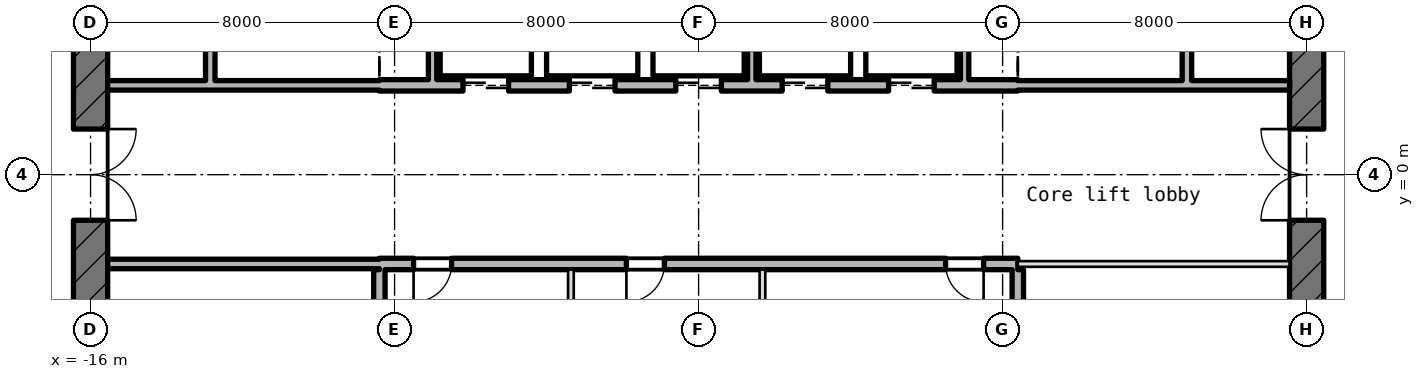
"""IFC4 building model, lengths in metres.
Left out: names, types, materials, properties, quantities, classifications, styles, units other than length and angle.
Written with IfcOpenShell. Run it as: python <this file> out.ifc"""

import sys

from ifc_helpers import new_model, si_unit, direction, frame, frame_2d, origin, place, context, subcontext, project, spatial, rectangle, extrude, element, fill, save


model = new_model("IFC4")
c1 = context("Model", 3, precision=1e-05, world=origin(), true_north=direction((0.0, 1.0)))
c2 = subcontext(c1, "Body", "Model", "MODEL_VIEW")
j1 = project(units=[si_unit("LENGTHUNIT", "METRE"), si_unit("PLANEANGLEUNIT", "RADIAN")], contexts=[c1])
p1 = place(None, origin())
s1 = spatial("IfcSite", under=j1, at=p1, CompositionType="ELEMENT")
p2 = place(p1, origin())
s2 = spatial("IfcBuilding", under=s1, at=p2, CompositionType="ELEMENT")
p3 = place(p2, frame((0.0, 0.0, 173.5)))
s3 = spatial("IfcBuildingStorey", under=s2, at=p3, CompositionType="ELEMENT", Elevation=173.5)
p4 = place(p3, frame((16.0, -10.186, -0.18), z_axis=(0.0, 0.0, 1.0), x_axis=(0.0, 1.0, 0.0)))
e1 = element("IfcWall", 1, at=p4, inside=s3, PredefinedType="SHEAR", context=c2, shape_type="SweptSolid", body=[
    extrude(rectangle(XDim=20.373, YDim=0.9, at=frame_2d((10.186, 0.0))), origin(), (0.0, 0.0, 1.0), 4.15),
])
p5 = place(p4, frame((8.986, 0.0, 0.18)))
e2 = element("IfcOpeningElement", 2, at=p5, cuts=e1, PredefinedType="OPENING", context=c2, shape_type="SweptSolid", body=[
    extrude(rectangle(XDim=2.4, YDim=2.1, at=frame_2d((1.2, 1.05))), frame((0.0, 0.46, 0.0), z_axis=(0.0, -1.0, 0.0), x_axis=(1.0, 0.0, 0.0)), (0.0, 0.0, 1.0), 0.92),
])
p6 = place(p4, frame((13.586, 0.0, 0.18)))
e3 = element("IfcOpeningElement", 3, at=p6, cuts=e1, PredefinedType="OPENING", context=c2, shape_type="SweptSolid", body=[
    extrude(rectangle(XDim=1.2, YDim=2.1, at=frame_2d((0.6, 1.05))), frame((0.0, 0.46, 0.0), z_axis=(0.0, -1.0, 0.0), x_axis=(1.0, 0.0, 0.0)), (0.0, 0.0, 1.0), 0.92),
])
p7 = place(p4, frame((2.4, 0.0, 0.18)))
e4 = element("IfcOpeningElement", 4, at=p7, cuts=e1, PredefinedType="OPENING", context=c2, shape_type="SweptSolid", body=[
    extrude(rectangle(XDim=1.2, YDim=2.1, at=frame_2d((0.6, 1.05))), frame((0.0, 0.46, 0.0), z_axis=(0.0, -1.0, 0.0), x_axis=(1.0, 0.0, 0.0)), (0.0, 0.0, 1.0), 0.92),
])
p8 = place(p3, frame((-16.0, 10.186, -0.18), z_axis=(0.0, 0.0, 1.0), x_axis=(0.0, -1.0, 0.0)))
e5 = element("IfcWall", 5, at=p8, inside=s3, PredefinedType="SHEAR", context=c2, shape_type="SweptSolid", body=[
    extrude(rectangle(XDim=20.373, YDim=0.9, at=frame_2d((10.186, 0.0))), origin(), (0.0, 0.0, 1.0), 4.15),
])
p9 = place(p8, frame((8.986, 0.0, 0.18)))
e6 = element("IfcOpeningElement", 6, at=p9, cuts=e5, PredefinedType="OPENING", context=c2, shape_type="SweptSolid", body=[
    extrude(rectangle(XDim=2.4, YDim=2.1, at=frame_2d((1.2, 1.05))), frame((0.0, 0.46, 0.0), z_axis=(0.0, -1.0, 0.0), x_axis=(1.0, 0.0, 0.0)), (0.0, 0.0, 1.0), 0.92),
])
p10 = place(p8, frame((5.586, 0.0, 0.18)))
e7 = element("IfcOpeningElement", 7, at=p10, cuts=e5, PredefinedType="OPENING", context=c2, shape_type="SweptSolid", body=[
    extrude(rectangle(XDim=1.2, YDim=2.1, at=frame_2d((0.6, 1.05))), frame((0.0, 0.46, 0.0), z_axis=(0.0, -1.0, 0.0), x_axis=(1.0, 0.0, 0.0)), (0.0, 0.0, 1.0), 0.92),
])
p11 = place(p3, frame((-15.55, -2.35, 0.0), z_axis=(0.0, 0.0, 1.0), x_axis=(1.0, 0.0, 0.0)))
e8 = element("IfcWall", 8, at=p11, inside=s3, PredefinedType="STANDARD", context=c2, shape_type="SweptSolid", body=[
    extrude(rectangle(XDim=7.15, YDim=0.25, at=frame_2d((3.575, 0.0))), origin(), (0.0, 0.0, 1.0), 3.97),
])
p12 = place(p3, frame((-8.4, -2.35, -0.18), z_axis=(0.0, 0.0, 1.0), x_axis=(1.0, 0.0, 0.0)))
e9 = element("IfcWall", 9, at=p12, inside=s3, PredefinedType="SHEAR", context=c2, shape_type="SweptSolid", body=[
    extrude(rectangle(XDim=16.8, YDim=0.3, at=frame_2d((8.4, 0.0))), origin(), (0.0, 0.0, 1.0), 4.15),
])
p13 = place(p12, frame((0.9, 0.0, 0.18)))
e10 = element("IfcOpeningElement", 10, at=p13, cuts=e9, PredefinedType="OPENING", context=c2, shape_type="SweptSolid", body=[
    extrude(rectangle(XDim=1.0, YDim=2.1, at=frame_2d((0.5, 1.05))), frame((0.0, 0.16, 0.0), z_axis=(0.0, -1.0, 0.0), x_axis=(1.0, 0.0, 0.0)), (0.0, 0.0, 1.0), 0.32),
])
p14 = place(p12, frame((6.5, 0.0, 0.18)))
e11 = element("IfcOpeningElement", 11, at=p14, cuts=e9, PredefinedType="OPENING", context=c2, shape_type="SweptSolid", body=[
    extrude(rectangle(XDim=1.0, YDim=2.1, at=frame_2d((0.5, 1.05))), frame((0.0, 0.16, 0.0), z_axis=(0.0, -1.0, 0.0), x_axis=(1.0, 0.0, 0.0)), (0.0, 0.0, 1.0), 0.32),
])
p15 = place(p12, frame((14.9, 0.0, 0.18)))
e12 = element("IfcOpeningElement", 12, at=p15, cuts=e9, PredefinedType="OPENING", context=c2, shape_type="SweptSolid", body=[
    extrude(rectangle(XDim=1.0, YDim=2.1, at=frame_2d((0.5, 1.05))), frame((0.0, 0.16, 0.0), z_axis=(0.0, -1.0, 0.0), x_axis=(1.0, 0.0, 0.0)), (0.0, 0.0, 1.0), 0.32),
])
p16 = place(p3, frame((8.4, -2.35, 0.0), z_axis=(0.0, 0.0, 1.0), x_axis=(1.0, 0.0, 0.0)))
e13 = element("IfcWall", 13, at=p16, inside=s3, PredefinedType="PARTITIONING", context=c2, shape_type="SweptSolid", body=[
    extrude(rectangle(XDim=7.15, YDim=0.15, at=frame_2d((3.575, 0.0))), origin(), (0.0, 0.0, 1.0), 3.97),
])
p17 = place(p3, frame((-15.55, 2.35, 0.0), z_axis=(0.0, 0.0, 1.0), x_axis=(1.0, 0.0, 0.0)))
e14 = element("IfcWall", 14, at=p17, inside=s3, PredefinedType="STANDARD", context=c2, shape_type="SweptSolid", body=[
    extrude(rectangle(XDim=7.15, YDim=0.25, at=frame_2d((3.575, 0.0))), origin(), (0.0, 0.0, 1.0), 3.97),
])
p18 = place(p3, frame((-8.4, 2.35, -0.18), z_axis=(0.0, 0.0, 1.0), x_axis=(1.0, 0.0, 0.0)))
e15 = element("IfcWall", 15, at=p18, inside=s3, PredefinedType="SHEAR", context=c2, shape_type="SweptSolid", body=[
    extrude(rectangle(XDim=16.8, YDim=0.3, at=frame_2d((8.4, 0.0))), origin(), (0.0, 0.0, 1.0), 4.15),
])
p19 = place(p18, frame((2.2, 0.0, 0.18)))
e16 = element("IfcOpeningElement", 16, at=p19, cuts=e15, PredefinedType="OPENING", context=c2, shape_type="SweptSolid", body=[
    extrude(rectangle(XDim=1.2, YDim=2.1, at=frame_2d((0.6, 1.05))), frame((0.0, 0.16, 0.0), z_axis=(0.0, -1.0, 0.0), x_axis=(1.0, 0.0, 0.0)), (0.0, 0.0, 1.0), 0.32),
])
p20 = place(p18, frame((5.0, 0.0, 0.18)))
e17 = element("IfcOpeningElement", 17, at=p20, cuts=e15, PredefinedType="OPENING", context=c2, shape_type="SweptSolid", body=[
    extrude(rectangle(XDim=1.2, YDim=2.1, at=frame_2d((0.6, 1.05))), frame((0.0, 0.16, 0.0), z_axis=(0.0, -1.0, 0.0), x_axis=(1.0, 0.0, 0.0)), (0.0, 0.0, 1.0), 0.32),
])
p21 = place(p18, frame((7.8, 0.0, 0.18)))
e18 = element("IfcOpeningElement", 18, at=p21, cuts=e15, PredefinedType="OPENING", context=c2, shape_type="SweptSolid", body=[
    extrude(rectangle(XDim=1.2, YDim=2.1, at=frame_2d((0.6, 1.05))), frame((0.0, 0.16, 0.0), z_axis=(0.0, -1.0, 0.0), x_axis=(1.0, 0.0, 0.0)), (0.0, 0.0, 1.0), 0.32),
])
p22 = place(p18, frame((10.6, 0.0, 0.18)))
e19 = element("IfcOpeningElement", 19, at=p22, cuts=e15, PredefinedType="OPENING", context=c2, shape_type="SweptSolid", body=[
    extrude(rectangle(XDim=1.2, YDim=2.1, at=frame_2d((0.6, 1.05))), frame((0.0, 0.16, 0.0), z_axis=(0.0, -1.0, 0.0), x_axis=(1.0, 0.0, 0.0)), (0.0, 0.0, 1.0), 0.32),
])
p23 = place(p18, frame((13.4, 0.0, 0.18)))
e20 = element("IfcOpeningElement", 20, at=p23, cuts=e15, PredefinedType="OPENING", context=c2, shape_type="SweptSolid", body=[
    extrude(rectangle(XDim=1.2, YDim=2.1, at=frame_2d((0.6, 1.05))), frame((0.0, 0.16, 0.0), z_axis=(0.0, -1.0, 0.0), x_axis=(1.0, 0.0, 0.0)), (0.0, 0.0, 1.0), 0.32),
])
p24 = place(p3, frame((8.4, 2.35, 0.0), z_axis=(0.0, 0.0, 1.0), x_axis=(1.0, 0.0, 0.0)))
e21 = element("IfcWall", 21, at=p24, inside=s3, PredefinedType="STANDARD", context=c2, shape_type="SweptSolid", body=[
    extrude(rectangle(XDim=7.15, YDim=0.25, at=frame_2d((3.575, 0.0))), origin(), (0.0, 0.0, 1.0), 3.97),
])
p25 = place(p3, frame((-12.85, 2.475, 0.0), z_axis=(0.0, 0.0, 1.0), x_axis=(0.0, 1.0, 0.0)))
e22 = element("IfcWall", 22, at=p25, inside=s3, PredefinedType="STANDARD", context=c2, shape_type="SweptSolid", body=[
    extrude(rectangle(XDim=3.05, YDim=0.25, at=frame_2d((1.525, 0.0))), origin(), (0.0, 0.0, 1.0), 3.97),
])
p26 = place(p3, frame((-8.4, -8.75, -0.18), z_axis=(0.0, 0.0, 1.0), x_axis=(0.0, 1.0, 0.0)))
e23 = element("IfcWall", 23, at=p26, inside=s3, PredefinedType="SHEAR", context=c2, shape_type="SweptSolid", body=[
    extrude(rectangle(XDim=6.25, YDim=0.3, at=frame_2d((3.125, 0.0))), origin(), (0.0, 0.0, 1.0), 4.15),
])
p27 = place(p3, frame((-7.0, 2.5, 0.0), z_axis=(0.0, 0.0, 1.0), x_axis=(0.0, 1.0, 0.0)))
e24 = element("IfcWall", 24, at=p27, inside=s3, PredefinedType="STANDARD", context=c2, shape_type="SweptSolid", body=[
    extrude(rectangle(XDim=2.74, YDim=0.22, at=frame_2d((1.37, 0.0))), origin(), (0.0, 0.0, 1.0), 3.97),
])
p28 = place(p3, frame((-3.36, -5.24, 0.0), z_axis=(0.0, 0.0, 1.0), x_axis=(0.0, 1.0, 0.0)))
e25 = element("IfcWall", 25, at=p28, inside=s3, PredefinedType="PARTITIONING", context=c2, shape_type="SweptSolid", body=[
    extrude(rectangle(XDim=2.74, YDim=0.15, at=frame_2d((1.37, 0.0))), origin(), (0.0, 0.0, 1.0), 3.97),
])
p29 = place(p3, frame((1.4, 2.5, 0.0), z_axis=(0.0, 0.0, 1.0), x_axis=(0.0, 1.0, 0.0)))
e26 = element("IfcWall", 26, at=p29, inside=s3, PredefinedType="STANDARD", context=c2, shape_type="SweptSolid", body=[
    extrude(rectangle(XDim=2.74, YDim=0.22, at=frame_2d((1.37, 0.0))), origin(), (0.0, 0.0, 1.0), 3.97),
])
p30 = place(p3, frame((1.68, -5.24, 0.0), z_axis=(0.0, 0.0, 1.0), x_axis=(0.0, 1.0, 0.0)))
e27 = element("IfcWall", 27, at=p30, inside=s3, PredefinedType="PARTITIONING", context=c2, shape_type="SweptSolid", body=[
    extrude(rectangle(XDim=2.74, YDim=0.15, at=frame_2d((1.37, 0.0))), origin(), (0.0, 0.0, 1.0), 3.97),
])
p31 = place(p3, frame((7.0, 2.5, 0.0), z_axis=(0.0, 0.0, 1.0), x_axis=(0.0, 1.0, 0.0)))
e28 = element("IfcWall", 28, at=p31, inside=s3, PredefinedType="STANDARD", context=c2, shape_type="SweptSolid", body=[
    extrude(rectangle(XDim=2.74, YDim=0.22, at=frame_2d((1.37, 0.0))), origin(), (0.0, 0.0, 1.0), 3.97),
])
p32 = place(p3, frame((8.4, -8.35, -0.18), z_axis=(0.0, 0.0, 1.0), x_axis=(0.0, 1.0, 0.0)))
e29 = element("IfcWall", 29, at=p32, inside=s3, PredefinedType="SHEAR", context=c2, shape_type="SweptSolid", body=[
    extrude(rectangle(XDim=5.85, YDim=0.3, at=frame_2d((2.925, 0.0))), origin(), (0.0, 0.0, 1.0), 4.15),
])
p33 = place(p3, frame((12.85, 2.475, 0.0), z_axis=(0.0, 0.0, 1.0), x_axis=(0.0, 1.0, 0.0)))
e30 = element("IfcWall", 30, at=p33, inside=s3, PredefinedType="STANDARD", context=c2, shape_type="SweptSolid", body=[
    extrude(rectangle(XDim=3.05, YDim=0.25, at=frame_2d((1.525, 0.0))), origin(), (0.0, 0.0, 1.0), 3.97),
])
p34 = place(p19, origin())
e31 = element("IfcDoor", 31, at=p34, inside=s3, OperationType="DOUBLE_DOOR_SLIDING", PredefinedType="DOOR", context=c2, shape_type="SweptSolid", body=[
    extrude(rectangle(XDim=1.2, YDim=2.1, at=frame_2d((0.6, 1.05))), frame((0.0, 0.025, 0.0), z_axis=(0.0, -1.0, 0.0), x_axis=(1.0, 0.0, 0.0)), (0.0, 0.0, 1.0), 0.05),
])
fill(e16, e31)
p35 = place(p20, origin())
e32 = element("IfcDoor", 32, at=p35, inside=s3, OperationType="DOUBLE_DOOR_SLIDING", PredefinedType="DOOR", context=c2, shape_type="SweptSolid", body=[
    extrude(rectangle(XDim=1.2, YDim=2.1, at=frame_2d((0.6, 1.05))), frame((0.0, 0.025, 0.0), z_axis=(0.0, -1.0, 0.0), x_axis=(1.0, 0.0, 0.0)), (0.0, 0.0, 1.0), 0.05),
])
fill(e17, e32)
p36 = place(p21, origin())
e33 = element("IfcDoor", 33, at=p36, inside=s3, OperationType="DOUBLE_DOOR_SLIDING", PredefinedType="DOOR", context=c2, shape_type="SweptSolid", body=[
    extrude(rectangle(XDim=1.2, YDim=2.1, at=frame_2d((0.6, 1.05))), frame((0.0, 0.025, 0.0), z_axis=(0.0, -1.0, 0.0), x_axis=(1.0, 0.0, 0.0)), (0.0, 0.0, 1.0), 0.05),
])
fill(e18, e33)
p37 = place(p22, origin())
e34 = element("IfcDoor", 34, at=p37, inside=s3, OperationType="DOUBLE_DOOR_SLIDING", PredefinedType="DOOR", context=c2, shape_type="SweptSolid", body=[
    extrude(rectangle(XDim=1.2, YDim=2.1, at=frame_2d((0.6, 1.05))), frame((0.0, 0.025, 0.0), z_axis=(0.0, -1.0, 0.0), x_axis=(1.0, 0.0, 0.0)), (0.0, 0.0, 1.0), 0.05),
])
fill(e19, e34)
p38 = place(p23, origin())
e35 = element("IfcDoor", 35, at=p38, inside=s3, OperationType="DOUBLE_DOOR_SLIDING", PredefinedType="DOOR", context=c2, shape_type="SweptSolid", body=[
    extrude(rectangle(XDim=1.2, YDim=2.1, at=frame_2d((0.6, 1.05))), frame((0.0, 0.025, 0.0), z_axis=(0.0, -1.0, 0.0), x_axis=(1.0, 0.0, 0.0)), (0.0, 0.0, 1.0), 0.05),
])
fill(e20, e35)
p39 = place(p9, origin())
e36 = element("IfcDoor", 36, at=p39, inside=s3, OperationType="DOUBLE_DOOR_SINGLE_SWING", PredefinedType="DOOR", context=c2, shape_type="SweptSolid", body=[
    extrude(rectangle(XDim=2.4, YDim=2.1, at=frame_2d((1.2, 1.05))), frame((0.0, 0.025, 0.0), z_axis=(0.0, -1.0, 0.0), x_axis=(1.0, 0.0, 0.0)), (0.0, 0.0, 1.0), 0.05),
])
fill(e6, e36)
p40 = place(p5, origin())
e37 = element("IfcDoor", 37, at=p40, inside=s3, OperationType="DOUBLE_DOOR_SINGLE_SWING", PredefinedType="DOOR", context=c2, shape_type="SweptSolid", body=[
    extrude(rectangle(XDim=2.4, YDim=2.1, at=frame_2d((1.2, 1.05))), frame((0.0, 0.025, 0.0), z_axis=(0.0, -1.0, 0.0), x_axis=(1.0, 0.0, 0.0)), (0.0, 0.0, 1.0), 0.05),
])
fill(e2, e37)
p41 = place(p13, frame((1.0, 0.0, 0.0), z_axis=(0.0, 0.0, 1.0), x_axis=(-1.0, 0.0, 0.0)))
e38 = element("IfcDoor", 38, at=p41, inside=s3, OperationType="SINGLE_SWING_LEFT", PredefinedType="DOOR", context=c2, shape_type="SweptSolid", body=[
    extrude(rectangle(XDim=1.0, YDim=2.1, at=frame_2d((0.5, 1.05))), frame((0.0, 0.025, 0.0), z_axis=(0.0, -1.0, 0.0), x_axis=(1.0, 0.0, 0.0)), (0.0, 0.0, 1.0), 0.05),
])
fill(e10, e38)
p42 = place(p14, frame((1.0, 0.0, 0.0), z_axis=(0.0, 0.0, 1.0), x_axis=(-1.0, 0.0, 0.0)))
e39 = element("IfcDoor", 39, at=p42, inside=s3, OperationType="SINGLE_SWING_LEFT", PredefinedType="DOOR", context=c2, shape_type="SweptSolid", body=[
    extrude(rectangle(XDim=1.0, YDim=2.1, at=frame_2d((0.5, 1.05))), frame((0.0, 0.025, 0.0), z_axis=(0.0, -1.0, 0.0), x_axis=(1.0, 0.0, 0.0)), (0.0, 0.0, 1.0), 0.05),
])
fill(e11, e39)
p43 = place(p15, frame((1.0, 0.0, 0.0), z_axis=(0.0, 0.0, 1.0), x_axis=(-1.0, 0.0, 0.0)))
e40 = element("IfcDoor", 40, at=p43, inside=s3, OperationType="SINGLE_SWING_LEFT", PredefinedType="DOOR", context=c2, shape_type="SweptSolid", body=[
    extrude(rectangle(XDim=1.0, YDim=2.1, at=frame_2d((0.5, 1.05))), frame((0.0, 0.025, 0.0), z_axis=(0.0, -1.0, 0.0), x_axis=(1.0, 0.0, 0.0)), (0.0, 0.0, 1.0), 0.05),
])
fill(e12, e40)
save(model, sys.argv[1])
